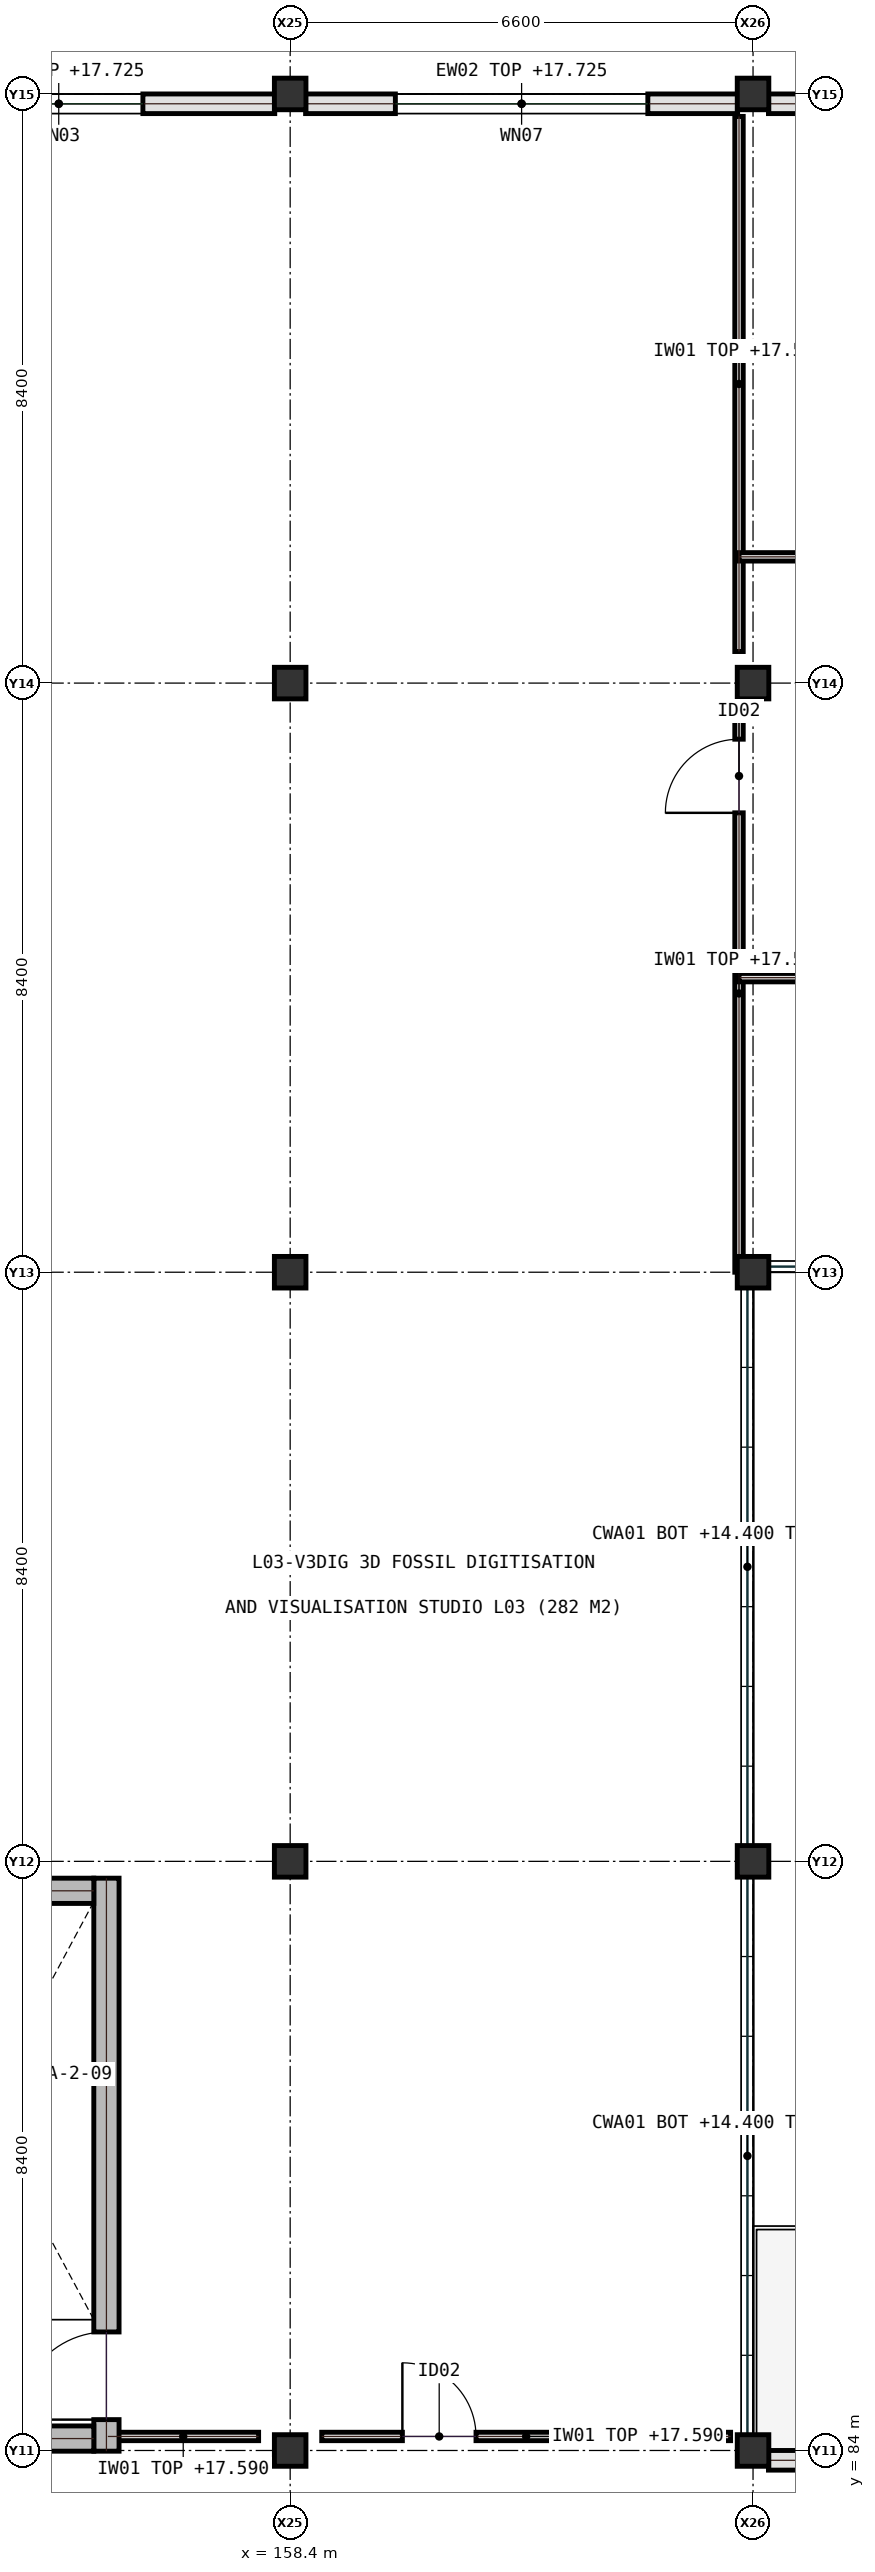
"""IFC4 building model, lengths in metres.
Left out: names, types, materials, properties, quantities, classifications, styles, units other than length and angle.
Written with IfcOpenShell. Run it as: python <this file> out.ifc"""

import sys

from ifc_helpers import new_model, si_unit, direction, frame, frame_2d, origin, origin_2d, place, context, subcontext, project, spatial, rectangle, extrude, element, fill, save


model = new_model("IFC4")
c1 = context("Model", 3, precision=1e-05, world=origin(), true_north=direction((0.0, 1.0)))
c2 = subcontext(c1, "Body", "Model", "MODEL_VIEW")
j1 = project(units=[si_unit("LENGTHUNIT", "METRE"), si_unit("PLANEANGLEUNIT", "RADIAN")], contexts=[c1])
p1 = place(None, origin())
s1 = spatial("IfcSite", under=j1, at=p1, CompositionType="ELEMENT")
p2 = place(p1, origin())
s2 = spatial("IfcBuilding", under=s1, at=p2, CompositionType="ELEMENT")
p3 = place(p2, frame((0.0, 0.0, 14.4)))
s3 = spatial("IfcBuildingStorey", under=s2, at=p3, CompositionType="ELEMENT", Elevation=14.4)
for number, where, z_axis, x_axis in (
    (1, (158.4, 84.0, 0.0), (0.0, 0.0, 1.0), (1.0, 0.0, 0.0)),
    (2, (158.4, 92.4, 0.0), (0.0, 0.0, 1.0), (1.0, 0.0, 0.0)),
    (3, (158.4, 100.8, 0.0), (0.0, 0.0, 1.0), (1.0, 0.0, 0.0)),
    (4, (158.4, 109.2, 0.0), (0.0, 0.0, 1.0), (1.0, 0.0, 0.0)),
    (5, (158.4, 117.6, 0.0), (0.0, 0.0, 1.0), (1.0, 0.0, 0.0)),
    (6, (165.0, 84.0, 0.0), (0.0, 0.0, 1.0), (1.0, 0.0, 0.0)),
    (7, (165.0, 92.4, 0.0), (0.0, 0.0, 1.0), (1.0, 0.0, 0.0)),
    (8, (165.0, 100.8, 0.0), (0.0, 0.0, 1.0), (1.0, 0.0, 0.0)),
    (9, (165.0, 109.2, 0.0), (0.0, 0.0, 1.0), (1.0, 0.0, 0.0)),
    (10, (165.0, 117.6, 0.0), (0.0, 0.0, 1.0), (1.0, 0.0, 0.0)),
):
    element("IfcColumn", number, at=place(p3, frame(where, z_axis=z_axis, x_axis=x_axis)), inside=s3, PredefinedType="COLUMN", context=c2, shape_type="SweptSolid", body=[
        extrude(rectangle(XDim=0.45, YDim=0.45, at=origin_2d()), origin(), (0.0, 0.0, 1.0), 4.2),
    ])
p4 = place(p3, frame((155.8, 84.2, 0.0), z_axis=(0.0, 0.0, 1.0), x_axis=(1.0, 0.0, 0.0)))
e11 = element("IfcWall", 11, at=p4, inside=s3, PredefinedType="PARTITIONING", context=c2, shape_type="SweptSolid", body=[
    extrude(rectangle(XDim=2.15, YDim=0.12, at=frame_2d((1.075, 0.0))), origin(), (0.0, 0.0, 1.0), 3.19),
])
p5 = place(p3, frame((158.85, 84.2, 0.0), z_axis=(0.0, 0.0, 1.0), x_axis=(1.0, 0.0, 0.0)))
e12 = element("IfcWall", 12, at=p5, inside=s3, PredefinedType="PARTITIONING", context=c2, shape_type="SweptSolid", body=[
    extrude(rectangle(XDim=5.83, YDim=0.12, at=frame_2d((2.915, 0.0))), origin(), (0.0, 0.0, 1.0), 3.19),
])
p6 = place(p5, frame((1.15, 0.0, 0.0)))
e13 = element("IfcOpeningElement", 13, at=p6, cuts=e12, PredefinedType="OPENING", context=c2, shape_type="SweptSolid", body=[
    extrude(rectangle(XDim=1.05, YDim=2.15, at=frame_2d((0.525, 1.075))), frame((0.0, 0.07, 0.0), z_axis=(0.0, -1.0, 0.0), x_axis=(1.0, 0.0, 0.0)), (0.0, 0.0, 1.0), 0.14),
])
p7 = place(p3, frame((164.8, 100.8, 0.0), z_axis=(0.0, 0.0, 1.0), x_axis=(0.0, 1.0, 0.0)))
e14 = element("IfcWall", 14, at=p7, inside=s3, PredefinedType="PARTITIONING", context=c2, shape_type="SweptSolid", body=[
    extrude(rectangle(XDim=7.95, YDim=0.12, at=frame_2d((3.975, 0.0))), origin(), (0.0, 0.0, 1.0), 3.19),
])
p8 = place(p7, frame((6.55, 0.0, 0.0)))
e15 = element("IfcOpeningElement", 15, at=p8, cuts=e14, PredefinedType="OPENING", context=c2, shape_type="SweptSolid", body=[
    extrude(rectangle(XDim=1.05, YDim=2.15, at=frame_2d((0.525, 1.075))), frame((0.0, 0.07, 0.0), z_axis=(0.0, -1.0, 0.0), x_axis=(1.0, 0.0, 0.0)), (0.0, 0.0, 1.0), 0.14),
])
p9 = place(p3, frame((164.8, 109.65, 0.0), z_axis=(0.0, 0.0, 1.0), x_axis=(0.0, 1.0, 0.0)))
e16 = element("IfcWall", 16, at=p9, inside=s3, PredefinedType="PARTITIONING", context=c2, shape_type="SweptSolid", body=[
    extrude(rectangle(XDim=7.63, YDim=0.12, at=frame_2d((3.815, 0.0))), origin(), (0.0, 0.0, 1.0), 3.19),
])
p10 = place(p3, frame((164.8, 105.0, 0.0), z_axis=(0.0, 0.0, 1.0), x_axis=(1.0, 0.0, 0.0)))
e17 = element("IfcWall", 17, at=p10, inside=s3, PredefinedType="PARTITIONING", context=c2, shape_type="SweptSolid", body=[
    extrude(rectangle(XDim=13.2, YDim=0.12, at=frame_2d((6.6, 0.0))), origin(), (0.0, 0.0, 1.0), 3.19),
])
p11 = place(p10, frame((4.0, 0.0, 0.0)))
e18 = element("IfcOpeningElement", 18, at=p11, cuts=e17, PredefinedType="OPENING", context=c2, shape_type="SweptSolid", body=[
    extrude(rectangle(XDim=0.9, YDim=2.1, at=frame_2d((0.45, 1.05))), frame((0.0, 0.07, 0.0), z_axis=(0.0, -1.0, 0.0), x_axis=(1.0, 0.0, 0.0)), (0.0, 0.0, 1.0), 0.14),
])
p12 = place(p10, frame((9.0, 0.0, 0.0)))
e19 = element("IfcOpeningElement", 19, at=p12, cuts=e17, PredefinedType="OPENING", context=c2, shape_type="SweptSolid", body=[
    extrude(rectangle(XDim=0.9, YDim=2.1, at=frame_2d((0.45, 1.05))), frame((0.0, 0.07, 0.0), z_axis=(0.0, -1.0, 0.0), x_axis=(1.0, 0.0, 0.0)), (0.0, 0.0, 1.0), 0.14),
])
p13 = place(p3, frame((164.8, 111.0, 0.0), z_axis=(0.0, 0.0, 1.0), x_axis=(1.0, 0.0, 0.0)))
e20 = element("IfcWall", 20, at=p13, inside=s3, PredefinedType="PARTITIONING", context=c2, shape_type="SweptSolid", body=[
    extrude(rectangle(XDim=13.2, YDim=0.12, at=frame_2d((6.6, 0.0))), origin(), (0.0, 0.0, 1.0), 3.19),
])
p14 = place(p13, frame((4.0, 0.0, 0.0)))
e21 = element("IfcOpeningElement", 21, at=p14, cuts=e20, PredefinedType="OPENING", context=c2, shape_type="SweptSolid", body=[
    extrude(rectangle(XDim=1.0, YDim=2.2, at=frame_2d((0.5, 1.1))), frame((0.0, 0.07, 0.0), z_axis=(0.0, -1.0, 0.0), x_axis=(1.0, 0.0, 0.0)), (0.0, 0.0, 1.0), 0.14),
])
p15 = place(p13, frame((9.0, 0.0, 0.0)))
e22 = element("IfcOpeningElement", 22, at=p15, cuts=e20, PredefinedType="OPENING", context=c2, shape_type="SweptSolid", body=[
    extrude(rectangle(XDim=1.0, YDim=2.2, at=frame_2d((0.5, 1.1))), frame((0.0, 0.07, 0.0), z_axis=(0.0, -1.0, 0.0), x_axis=(1.0, 0.0, 0.0)), (0.0, 0.0, 1.0), 0.14),
])
p16 = place(p3, frame((158.18, 117.46, 0.0), z_axis=(0.0, 0.0, 1.0), x_axis=(-1.0, 0.0, 0.0)))
e23 = element("IfcWall", 23, at=p16, inside=s3, PredefinedType="SOLIDWALL", context=c2, shape_type="SweptSolid", body=[
    extrude(rectangle(XDim=6.16, YDim=0.28, at=frame_2d((3.08, 0.0))), origin(), (0.0, 0.0, 1.0), 3.325),
])
p17 = place(p16, frame((1.88, 0.0, 0.95)))
e24 = element("IfcOpeningElement", 24, at=p17, cuts=e23, PredefinedType="OPENING", context=c2, shape_type="SweptSolid", body=[
    extrude(rectangle(XDim=2.4, YDim=1.6, at=frame_2d((1.2, 0.8))), frame((0.0, 0.15, 0.0), z_axis=(0.0, -1.0, 0.0), x_axis=(1.0, 0.0, 0.0)), (0.0, 0.0, 1.0), 0.3),
])
p18 = place(p3, frame((164.78, 117.46, 0.0), z_axis=(0.0, 0.0, 1.0), x_axis=(-1.0, 0.0, 0.0)))
e25 = element("IfcWall", 25, at=p18, inside=s3, PredefinedType="SOLIDWALL", context=c2, shape_type="SweptSolid", body=[
    extrude(rectangle(XDim=6.16, YDim=0.28, at=frame_2d((3.08, 0.0))), origin(), (0.0, 0.0, 1.0), 3.325),
])
p19 = place(p18, frame((1.28, 0.0, 0.95)))
e26 = element("IfcOpeningElement", 26, at=p19, cuts=e25, PredefinedType="OPENING", context=c2, shape_type="SweptSolid", body=[
    extrude(rectangle(XDim=3.6, YDim=2.0, at=frame_2d((1.8, 1.0))), frame((0.0, 0.15, 0.0), z_axis=(0.0, -1.0, 0.0), x_axis=(1.0, 0.0, 0.0)), (0.0, 0.0, 1.0), 0.3),
])
p20 = place(p3, frame((171.38, 83.86, 0.0), z_axis=(0.0, 0.0, 1.0), x_axis=(-1.0, 0.0, 0.0)))
e27 = element("IfcWall", 27, at=p20, inside=s3, PredefinedType="SOLIDWALL", context=c2, shape_type="SweptSolid", body=[
    extrude(rectangle(XDim=6.16, YDim=0.28, at=frame_2d((3.08, 0.0))), origin(), (0.0, 0.0, 1.0), 3.325),
])
p21 = place(p20, frame((2.53, 0.0, 0.0)))
e28 = element("IfcOpeningElement", 28, at=p21, cuts=e27, PredefinedType="OPENING", context=c2, shape_type="SweptSolid", body=[
    extrude(rectangle(XDim=1.1, YDim=2.2, at=frame_2d((0.55, 1.1))), frame((0.0, 0.15, 0.0), z_axis=(0.0, -1.0, 0.0), x_axis=(1.0, 0.0, 0.0)), (0.0, 0.0, 1.0), 0.3),
])
p22 = place(p3, frame((171.38, 117.46, 0.0), z_axis=(0.0, 0.0, 1.0), x_axis=(-1.0, 0.0, 0.0)))
e29 = element("IfcWall", 29, at=p22, inside=s3, PredefinedType="SOLIDWALL", context=c2, shape_type="SweptSolid", body=[
    extrude(rectangle(XDim=6.16, YDim=0.28, at=frame_2d((3.08, 0.0))), origin(), (0.0, 0.0, 1.0), 3.325),
])
p23 = place(p22, frame((2.405, 0.0, 0.95)))
e30 = element("IfcOpeningElement", 30, at=p23, cuts=e29, PredefinedType="OPENING", context=c2, shape_type="SweptSolid", body=[
    extrude(rectangle(XDim=1.35, YDim=1.55, at=frame_2d((0.675, 0.775))), frame((0.0, 0.15, 0.0), z_axis=(0.0, -1.0, 0.0), x_axis=(1.0, 0.0, 0.0)), (0.0, 0.0, 1.0), 0.3),
])
p24 = place(p3, frame((155.78, 83.99, 0.0), z_axis=(0.0, 0.0, 1.0), x_axis=(0.0, 1.0, 0.0)))
e31 = element("IfcWall", 31, at=p24, inside=s3, PredefinedType="SHEAR", context=c2, shape_type="SweptSolid", body=[
    extrude(rectangle(XDim=8.17, YDim=0.36, at=frame_2d((4.085, 0.0))), origin(), (0.0, 0.0, 1.0), 3.94),
])
p25 = place(p24, frame((0.45, 0.0, 0.0)))
e32 = element("IfcOpeningElement", 32, at=p25, cuts=e31, PredefinedType="OPENING", context=c2, shape_type="SweptSolid", body=[
    extrude(rectangle(XDim=1.25, YDim=2.15, at=frame_2d((0.625, 1.075))), frame((0.0, 0.19, 0.0), z_axis=(0.0, -1.0, 0.0), x_axis=(1.0, 0.0, 0.0)), (0.0, 0.0, 1.0), 0.38),
])
for number, where, z_axis, x_axis in (
    (33, (152.4, 91.98, 0.0), (0.0, 0.0, 1.0), (1.0, 0.0, 0.0)),
    (34, (152.4, 84.17, 0.0), (0.0, 0.0, 1.0), (1.0, 0.0, 0.0)),
):
    element("IfcWall", number, at=place(p3, frame(where, z_axis=z_axis, x_axis=x_axis)), inside=s3, PredefinedType="SHEAR", context=c2, shape_type="SweptSolid", body=[
        extrude(rectangle(XDim=3.2, YDim=0.36, at=frame_2d((1.6, 0.0))), origin(), (0.0, 0.0, 1.0), 3.94),
    ])
p26 = place(p6, origin())
e35 = element("IfcDoor", 35, at=p26, inside=s3, OperationType="SINGLE_SWING_LEFT", PredefinedType="DOOR", context=c2, shape_type="SweptSolid", body=[
    extrude(rectangle(XDim=1.05, YDim=2.15, at=frame_2d((0.525, 1.075))), frame((0.0, 0.025, 0.0), z_axis=(0.0, -1.0, 0.0), x_axis=(1.0, 0.0, 0.0)), (0.0, 0.0, 1.0), 0.05),
])
fill(e13, e35)
p27 = place(p8, origin())
e36 = element("IfcDoor", 36, at=p27, inside=s3, OperationType="SINGLE_SWING_LEFT", PredefinedType="DOOR", context=c2, shape_type="SweptSolid", body=[
    extrude(rectangle(XDim=1.05, YDim=2.15, at=frame_2d((0.525, 1.075))), frame((0.0, 0.025, 0.0), z_axis=(0.0, -1.0, 0.0), x_axis=(1.0, 0.0, 0.0)), (0.0, 0.0, 1.0), 0.05),
])
fill(e15, e36)
p28 = place(p17, origin())
e37 = element("IfcWindow", 37, at=p28, inside=s3, PartitioningType="SINGLE_PANEL", PredefinedType="WINDOW", context=c2, shape_type="SweptSolid", body=[
    extrude(rectangle(XDim=2.4, YDim=1.6, at=frame_2d((1.2, 0.8))), frame((0.0, 0.03, 0.0), z_axis=(0.0, -1.0, 0.0), x_axis=(1.0, 0.0, 0.0)), (0.0, 0.0, 1.0), 0.06),
])
fill(e24, e37)
p29 = place(p19, origin())
e38 = element("IfcWindow", 38, at=p29, inside=s3, PartitioningType="SINGLE_PANEL", PredefinedType="WINDOW", context=c2, shape_type="SweptSolid", body=[
    extrude(rectangle(XDim=3.6, YDim=2.0, at=frame_2d((1.8, 1.0))), frame((0.0, 0.03, 0.0), z_axis=(0.0, -1.0, 0.0), x_axis=(1.0, 0.0, 0.0)), (0.0, 0.0, 1.0), 0.06),
])
fill(e26, e38)
p30 = place(p25, origin())
e39 = element("IfcDoor", 39, at=p30, inside=s3, OperationType="SINGLE_SWING_LEFT", PredefinedType="DOOR", context=c2, shape_type="SweptSolid", body=[
    extrude(rectangle(XDim=1.25, YDim=2.15, at=frame_2d((0.625, 1.075))), frame((0.0, 0.025, 0.0), z_axis=(0.0, -1.0, 0.0), x_axis=(1.0, 0.0, 0.0)), (0.0, 0.0, 1.0), 0.05),
])
fill(e32, e39)
save(model, sys.argv[1])
